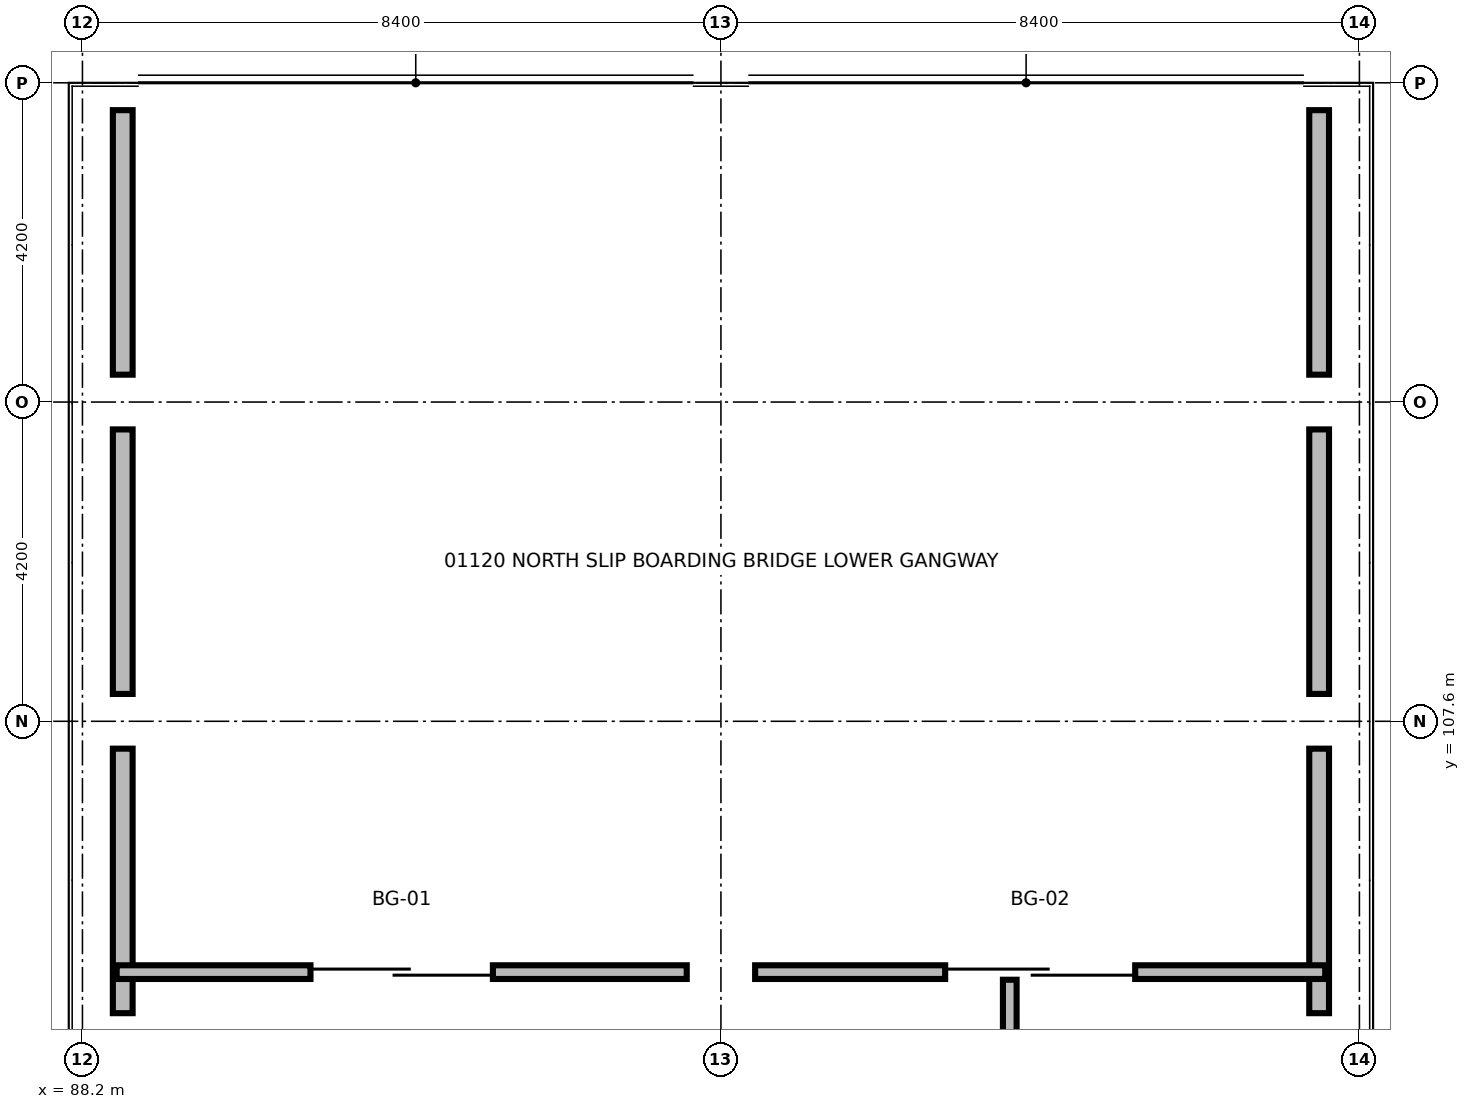
"""IFC4 building model, lengths in metres.
Left out: names, types, materials, properties, quantities, classifications, styles, units other than length and angle.
Written with IfcOpenShell. Run it as: python <this file> out.ifc"""

import sys

from ifc_helpers import new_model, si_unit, direction, frame, frame_2d, origin, place, context, subcontext, project, spatial, rectangle, extrude, element, fill, save


model = new_model("IFC4")
c1 = context("Model", 3, precision=1e-05, world=origin(), true_north=direction((0.0, 1.0)))
c2 = subcontext(c1, "Body", "Model", "MODEL_VIEW")
j1 = project(units=[si_unit("LENGTHUNIT", "METRE"), si_unit("PLANEANGLEUNIT", "RADIAN")], contexts=[c1])
p1 = place(None, origin())
s1 = spatial("IfcSite", under=j1, at=p1, CompositionType="ELEMENT")
p2 = place(p1, origin())
s2 = spatial("IfcBuilding", under=s1, at=p2, CompositionType="ELEMENT")
p3 = place(p2, frame((0.0, 0.0, 5.1)))
s3 = spatial("IfcBuildingStorey", under=s2, at=p3, CompositionType="ELEMENT", Elevation=5.1)
for number, where, z_axis, x_axis in (
    (1, (88.73, 103.76, 0.0), (0.0, 0.0, 1.0), (0.0, 1.0, 0.0)),
    (2, (104.47, 107.24, 0.0), (0.0, 0.0, 1.0), (0.0, -1.0, 0.0)),
    (3, (88.73, 107.96, 0.0), (0.0, 0.0, 1.0), (0.0, 1.0, 0.0)),
    (4, (104.47, 111.44, 0.0), (0.0, 0.0, 1.0), (0.0, -1.0, 0.0)),
    (5, (88.73, 112.16, 0.0), (0.0, 0.0, 1.0), (0.0, 1.0, 0.0)),
    (6, (104.47, 115.64, 0.0), (0.0, 0.0, 1.0), (0.0, -1.0, 0.0)),
):
    element("IfcWall", number, at=place(p3, frame(where, z_axis=z_axis, x_axis=x_axis)), inside=s3, PredefinedType="SOLIDWALL", context=c2, shape_type="SweptSolid", body=[
        extrude(rectangle(XDim=3.48, YDim=0.26, at=frame_2d((1.74, 0.0))), origin(), (0.0, 0.0, 1.0), 3.364),
    ])
p4 = place(p3, frame((88.65, 104.3, 0.0), z_axis=(0.0, 0.0, 1.0), x_axis=(1.0, 0.0, 0.0)))
e7 = element("IfcWall", 7, at=p4, inside=s3, PredefinedType="PARTITIONING", context=c2, shape_type="SweptSolid", body=[
    extrude(rectangle(XDim=7.5, YDim=0.18, at=frame_2d((3.75, 0.0))), origin(), (0.0, 0.0, 1.0), 3.364),
])
p5 = place(p4, frame((2.55, 0.0, 0.0)))
e8 = element("IfcOpeningElement", 8, at=p5, cuts=e7, PredefinedType="OPENING", context=c2, shape_type="SweptSolid", body=[
    extrude(rectangle(XDim=2.4, YDim=2.5, at=frame_2d((1.2, 1.25))), frame((0.0, 0.1, 0.0), z_axis=(0.0, -1.0, 0.0), x_axis=(1.0, 0.0, 0.0)), (0.0, 0.0, 1.0), 0.2),
])
p6 = place(p3, frame((97.05, 104.3, 0.0), z_axis=(0.0, 0.0, 1.0), x_axis=(1.0, 0.0, 0.0)))
e9 = element("IfcWall", 9, at=p6, inside=s3, PredefinedType="PARTITIONING", context=c2, shape_type="SweptSolid", body=[
    extrude(rectangle(XDim=7.5, YDim=0.18, at=frame_2d((3.75, 0.0))), origin(), (0.0, 0.0, 1.0), 3.364),
])
p7 = place(p6, frame((2.5, 0.0, 0.0)))
e10 = element("IfcOpeningElement", 10, at=p7, cuts=e9, PredefinedType="OPENING", context=c2, shape_type="SweptSolid", body=[
    extrude(rectangle(XDim=2.5, YDim=2.5, at=frame_2d((1.25, 1.25))), frame((0.0, 0.1, 0.0), z_axis=(0.0, -1.0, 0.0), x_axis=(1.0, 0.0, 0.0)), (0.0, 0.0, 1.0), 0.2),
])
p8 = place(p3, frame((100.4, 60.8, 0.0), z_axis=(0.0, 0.0, 1.0), x_axis=(0.0, 1.0, 0.0)))
e11 = element("IfcWall", 11, at=p8, inside=s3, PredefinedType="PARTITIONING", context=c2, shape_type="SweptSolid", body=[
    extrude(rectangle(XDim=43.4, YDim=0.18, at=frame_2d((21.7, 0.0))), origin(), (0.0, 0.0, 1.0), 3.603),
])
p9 = place(p8, frame((12.095, 0.0, 0.0)))
e12 = element("IfcOpeningElement", 12, at=p9, cuts=e11, PredefinedType="OPENING", context=c2, shape_type="SweptSolid", body=[
    extrude(rectangle(XDim=1.85, YDim=2.3, at=frame_2d((0.925, 1.15))), frame((0.0, 0.1, 0.0), z_axis=(0.0, -1.0, 0.0), x_axis=(1.0, 0.0, 0.0)), (0.0, 0.0, 1.0), 0.2),
])
p10 = place(p8, frame((31.625, 0.0, 0.0)))
e13 = element("IfcOpeningElement", 13, at=p10, cuts=e11, PredefinedType="OPENING", context=c2, shape_type="SweptSolid", body=[
    extrude(rectangle(XDim=1.85, YDim=2.3, at=frame_2d((0.925, 1.15))), frame((0.0, 0.1, 0.0), z_axis=(0.0, -1.0, 0.0), x_axis=(1.0, 0.0, 0.0)), (0.0, 0.0, 1.0), 0.2),
])
p11 = place(p5, origin())
e14 = element("IfcDoor", 14, at=p11, inside=s3, OperationType="DOUBLE_DOOR_SLIDING", PredefinedType="GATE", context=c2, shape_type="SweptSolid", body=[
    extrude(rectangle(XDim=2.4, YDim=2.5, at=frame_2d((1.2, 1.25))), frame((0.0, 0.025, 0.0), z_axis=(0.0, -1.0, 0.0), x_axis=(1.0, 0.0, 0.0)), (0.0, 0.0, 1.0), 0.05),
])
fill(e8, e14)
p12 = place(p7, origin())
e15 = element("IfcDoor", 15, at=p12, inside=s3, OperationType="DOUBLE_DOOR_SLIDING", PredefinedType="GATE", context=c2, shape_type="SweptSolid", body=[
    extrude(rectangle(XDim=2.5, YDim=2.5, at=frame_2d((1.25, 1.25))), frame((0.0, 0.025, 0.0), z_axis=(0.0, -1.0, 0.0), x_axis=(1.0, 0.0, 0.0)), (0.0, 0.0, 1.0), 0.05),
])
fill(e10, e15)
save(model, sys.argv[1])
